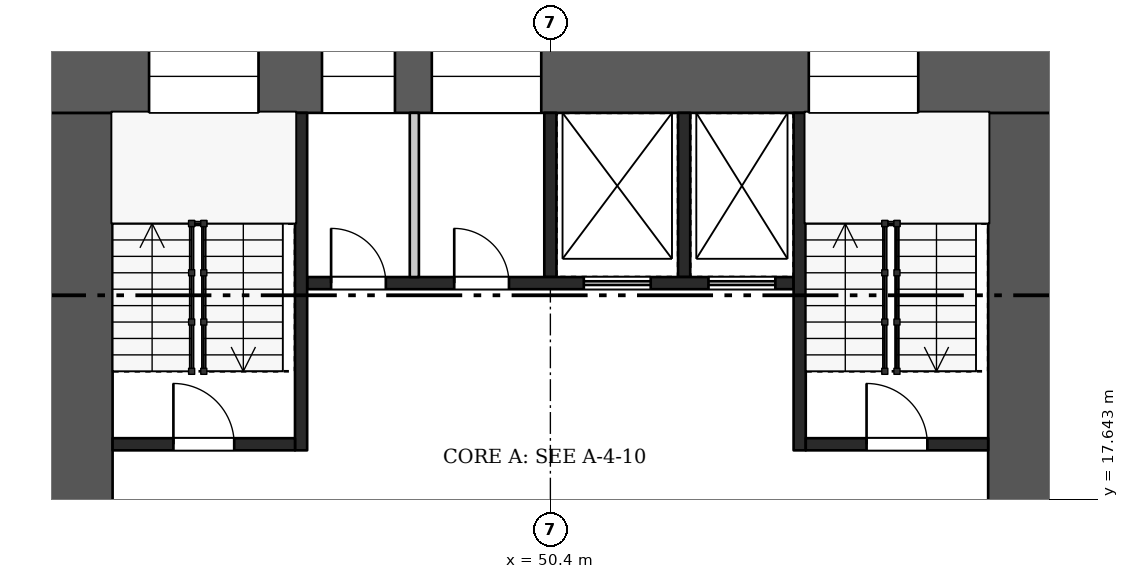
"""IFC4 building model, lengths in metres.
Left out: names, types, materials, properties, quantities, classifications, styles, units other than length and angle.
Written with IfcOpenShell. Run it as: python <this file> out.ifc"""

import sys

from ifc_helpers import new_model, si_unit, direction, frame, frame_2d, origin, place, context, subcontext, project, spatial, rectangle, extrude, element, fill, save


model = new_model("IFC4")
c1 = context("Model", 3, precision=1e-05, world=origin(), true_north=direction((0.0, 1.0)))
c2 = subcontext(c1, "Body", "Model", "MODEL_VIEW")
j1 = project(units=[si_unit("LENGTHUNIT", "METRE"), si_unit("PLANEANGLEUNIT", "RADIAN")], contexts=[c1])
p1 = place(None, origin())
s1 = spatial("IfcSite", under=j1, at=p1, CompositionType="ELEMENT")
p2 = place(p1, origin())
s2 = spatial("IfcBuilding", under=s1, at=p2, CompositionType="ELEMENT")
p3 = place(p2, frame((0.0, 0.0, 35.7)))
s3 = spatial("IfcBuildingStorey", under=s2, at=p3, CompositionType="ELEMENT", Elevation=35.7)
p4 = place(p3, frame((42.0, 24.6, 0.0), z_axis=(0.0, 0.0, 1.0), x_axis=(1.0, 0.0, 0.0)))
e1 = element("IfcWall", 1, at=p4, inside=s3, PredefinedType="SHEAR", context=c2, shape_type="SweptSolid", body=[
    extrude(rectangle(XDim=16.8, YDim=1.2, at=frame_2d((8.4, 0.0))), origin(), (0.0, 0.0, 1.0), 3.22),
])
p5 = place(p4, frame((1.8, 0.0, 0.5)))
e2 = element("IfcOpeningElement", 2, at=p5, cuts=e1, PredefinedType="OPENING", context=c2, shape_type="SweptSolid", body=[
    extrude(rectangle(XDim=1.8, YDim=2.4, at=frame_2d((0.9, 1.2))), frame((0.0, 0.61, 0.0), z_axis=(0.0, -1.0, 0.0), x_axis=(1.0, 0.0, 0.0)), (0.0, 0.0, 1.0), 1.22),
])
p6 = place(p4, frame((4.644, 0.0, 1.6)))
e3 = element("IfcOpeningElement", 3, at=p6, cuts=e1, PredefinedType="OPENING", context=c2, shape_type="SweptSolid", body=[
    extrude(rectangle(XDim=1.2, YDim=1.2, at=frame_2d((0.6, 0.6))), frame((0.0, 0.61, 0.0), z_axis=(0.0, -1.0, 0.0), x_axis=(1.0, 0.0, 0.0)), (0.0, 0.0, 1.0), 1.22),
])
p7 = place(p4, frame((6.45, 0.0, 1.6)))
e4 = element("IfcOpeningElement", 4, at=p7, cuts=e1, PredefinedType="OPENING", context=c2, shape_type="SweptSolid", body=[
    extrude(rectangle(XDim=1.8, YDim=1.2, at=frame_2d((0.9, 0.6))), frame((0.0, 0.61, 0.0), z_axis=(0.0, -1.0, 0.0), x_axis=(1.0, 0.0, 0.0)), (0.0, 0.0, 1.0), 1.22),
])
p8 = place(p4, frame((12.65, 0.0, 0.5)))
e5 = element("IfcOpeningElement", 5, at=p8, cuts=e1, PredefinedType="OPENING", context=c2, shape_type="SweptSolid", body=[
    extrude(rectangle(XDim=1.8, YDim=2.4, at=frame_2d((0.9, 1.2))), frame((0.0, 0.61, 0.0), z_axis=(0.0, -1.0, 0.0), x_axis=(1.0, 0.0, 0.0)), (0.0, 0.0, 1.0), 1.22),
])
p9 = place(p3, frame((42.6, 9.6, 0.0), z_axis=(0.0, 0.0, 1.0), x_axis=(0.0, 1.0, 0.0)))
e6 = element("IfcWall", 6, at=p9, inside=s3, PredefinedType="SHEAR", context=c2, shape_type="SweptSolid", body=[
    extrude(rectangle(XDim=14.4, YDim=1.2, at=frame_2d((7.2, 0.0))), origin(), (0.0, 0.0, 1.0), 3.22),
])
p10 = place(p9, frame((2.1, 0.0, 0.0)))
e7 = element("IfcOpeningElement", 7, at=p10, cuts=e6, PredefinedType="OPENING", context=c2, shape_type="SweptSolid", body=[
    extrude(rectangle(XDim=1.8, YDim=2.1, at=frame_2d((0.9, 1.05))), frame((0.0, 0.61, 0.0), z_axis=(0.0, -1.0, 0.0), x_axis=(1.0, 0.0, 0.0)), (0.0, 0.0, 1.0), 1.22),
])
p11 = place(p3, frame((58.2, 9.6, 0.0), z_axis=(0.0, 0.0, 1.0), x_axis=(0.0, 1.0, 0.0)))
e8 = element("IfcWall", 8, at=p11, inside=s3, PredefinedType="SHEAR", context=c2, shape_type="SweptSolid", body=[
    extrude(rectangle(XDim=14.4, YDim=1.2, at=frame_2d((7.2, 0.0))), origin(), (0.0, 0.0, 1.0), 3.22),
])
p12 = place(p11, frame((2.1, 0.0, 0.0)))
e9 = element("IfcOpeningElement", 9, at=p12, cuts=e8, PredefinedType="OPENING", context=c2, shape_type="SweptSolid", body=[
    extrude(rectangle(XDim=1.8, YDim=2.1, at=frame_2d((0.9, 1.05))), frame((0.0, 0.61, 0.0), z_axis=(0.0, -1.0, 0.0), x_axis=(1.0, 0.0, 0.0)), (0.0, 0.0, 1.0), 1.22),
])
for number, where, z_axis, x_axis in (
    (10, (50.4, 21.3, 0.0), (0.0, 0.0, 1.0), (0.0, 1.0, 0.0)),
    (11, (52.6, 21.3, 0.0), (0.0, 0.0, 1.0), (0.0, 1.0, 0.0)),
):
    element("IfcWall", number, at=place(p3, frame(where, z_axis=z_axis, x_axis=x_axis)), inside=s3, PredefinedType="SHEAR", context=c2, shape_type="SweptSolid", body=[
        extrude(rectangle(XDim=2.7, YDim=0.2, at=frame_2d((1.35, 0.0))), origin(), (0.0, 0.0, 1.0), 3.22),
    ])
p13 = place(p3, frame((48.163, 21.3, 0.0), z_axis=(0.0, 0.0, 1.0), x_axis=(0.0, 1.0, 0.0)))
e12 = element("IfcWall", 12, at=p13, inside=s3, PredefinedType="PARTITIONING", context=c2, shape_type="SweptSolid", body=[
    extrude(rectangle(XDim=2.7, YDim=0.15, at=frame_2d((1.35, 0.0))), origin(), (0.0, 0.0, 1.0), 3.22),
])
p14 = place(p3, frame((46.4, 21.2, 0.0), z_axis=(0.0, 0.0, 1.0), x_axis=(1.0, 0.0, 0.0)))
e13 = element("IfcWall", 13, at=p14, inside=s3, PredefinedType="SHEAR", context=c2, shape_type="SweptSolid", body=[
    extrude(rectangle(XDim=8.0, YDim=0.2, at=frame_2d((4.0, 0.0))), origin(), (0.0, 0.0, 1.0), 3.22),
])
p15 = place(p14, frame((0.394, 0.0, 0.0)))
e14 = element("IfcOpeningElement", 14, at=p15, cuts=e13, PredefinedType="OPENING", context=c2, shape_type="SweptSolid", body=[
    extrude(rectangle(XDim=0.9, YDim=2.1, at=frame_2d((0.45, 1.05))), frame((0.0, 0.11, 0.0), z_axis=(0.0, -1.0, 0.0), x_axis=(1.0, 0.0, 0.0)), (0.0, 0.0, 1.0), 0.22),
])
p16 = place(p14, frame((2.419, 0.0, 0.0)))
e15 = element("IfcOpeningElement", 15, at=p16, cuts=e13, PredefinedType="OPENING", context=c2, shape_type="SweptSolid", body=[
    extrude(rectangle(XDim=0.9, YDim=2.1, at=frame_2d((0.45, 1.05))), frame((0.0, 0.11, 0.0), z_axis=(0.0, -1.0, 0.0), x_axis=(1.0, 0.0, 0.0)), (0.0, 0.0, 1.0), 0.22),
])
p17 = place(p14, frame((4.55, 0.0, 0.0)))
e16 = element("IfcOpeningElement", 16, at=p17, cuts=e13, PredefinedType="OPENING", context=c2, shape_type="SweptSolid", body=[
    extrude(rectangle(XDim=1.1, YDim=2.1, at=frame_2d((0.55, 1.05))), frame((0.0, 0.11, 0.0), z_axis=(0.0, -1.0, 0.0), x_axis=(1.0, 0.0, 0.0)), (0.0, 0.0, 1.0), 0.22),
])
p18 = place(p14, frame((6.6, 0.0, 0.0)))
e17 = element("IfcOpeningElement", 17, at=p18, cuts=e13, PredefinedType="OPENING", context=c2, shape_type="SweptSolid", body=[
    extrude(rectangle(XDim=1.1, YDim=2.1, at=frame_2d((0.55, 1.05))), frame((0.0, 0.11, 0.0), z_axis=(0.0, -1.0, 0.0), x_axis=(1.0, 0.0, 0.0)), (0.0, 0.0, 1.0), 0.22),
])
p19 = place(p3, frame((46.3, 18.45, 0.0), z_axis=(0.0, 0.0, 1.0), x_axis=(0.0, 1.0, 0.0)))
e18 = element("IfcWall", 18, at=p19, inside=s3, PredefinedType="SHEAR", context=c2, shape_type="SweptSolid", body=[
    extrude(rectangle(XDim=5.55, YDim=0.2, at=frame_2d((2.775, 0.0))), origin(), (0.0, 0.0, 1.0), 3.22),
])
p20 = place(p3, frame((43.2, 18.55, 0.0), z_axis=(0.0, 0.0, 1.0), x_axis=(1.0, 0.0, 0.0)))
e19 = element("IfcWall", 19, at=p20, inside=s3, PredefinedType="SHEAR", context=c2, shape_type="SweptSolid", body=[
    extrude(rectangle(XDim=3.0, YDim=0.2, at=frame_2d((1.5, 0.0))), origin(), (0.0, 0.0, 1.0), 3.22),
])
p21 = place(p20, frame((1.0, 0.0, 0.0)))
e20 = element("IfcOpeningElement", 20, at=p21, cuts=e19, PredefinedType="OPENING", context=c2, shape_type="SweptSolid", body=[
    extrude(rectangle(XDim=1.0, YDim=2.1, at=frame_2d((0.5, 1.05))), frame((0.0, 0.11, 0.0), z_axis=(0.0, -1.0, 0.0), x_axis=(1.0, 0.0, 0.0)), (0.0, 0.0, 1.0), 0.22),
])
p22 = place(p3, frame((54.5, 18.45, 0.0), z_axis=(0.0, 0.0, 1.0), x_axis=(0.0, 1.0, 0.0)))
e21 = element("IfcWall", 21, at=p22, inside=s3, PredefinedType="SHEAR", context=c2, shape_type="SweptSolid", body=[
    extrude(rectangle(XDim=5.55, YDim=0.2, at=frame_2d((2.775, 0.0))), origin(), (0.0, 0.0, 1.0), 3.22),
])
p23 = place(p3, frame((54.6, 18.55, 0.0), z_axis=(0.0, 0.0, 1.0), x_axis=(1.0, 0.0, 0.0)))
e22 = element("IfcWall", 22, at=p23, inside=s3, PredefinedType="SHEAR", context=c2, shape_type="SweptSolid", body=[
    extrude(rectangle(XDim=3.0, YDim=0.2, at=frame_2d((1.5, 0.0))), origin(), (0.0, 0.0, 1.0), 3.22),
])
p24 = place(p23, frame((1.0, 0.0, 0.0)))
e23 = element("IfcOpeningElement", 23, at=p24, cuts=e22, PredefinedType="OPENING", context=c2, shape_type="SweptSolid", body=[
    extrude(rectangle(XDim=1.0, YDim=2.1, at=frame_2d((0.5, 1.05))), frame((0.0, 0.11, 0.0), z_axis=(0.0, -1.0, 0.0), x_axis=(1.0, 0.0, 0.0)), (0.0, 0.0, 1.0), 0.22),
])
p25 = place(p15, origin())
e24 = element("IfcDoor", 24, at=p25, inside=s3, OperationType="SINGLE_SWING_LEFT", PredefinedType="DOOR", context=c2, shape_type="SweptSolid", body=[
    extrude(rectangle(XDim=0.9, YDim=2.1, at=frame_2d((0.45, 1.05))), frame((0.0, 0.025, 0.0), z_axis=(0.0, -1.0, 0.0), x_axis=(1.0, 0.0, 0.0)), (0.0, 0.0, 1.0), 0.05),
])
fill(e14, e24)
p26 = place(p16, origin())
e25 = element("IfcDoor", 25, at=p26, inside=s3, OperationType="SINGLE_SWING_LEFT", PredefinedType="DOOR", context=c2, shape_type="SweptSolid", body=[
    extrude(rectangle(XDim=0.9, YDim=2.1, at=frame_2d((0.45, 1.05))), frame((0.0, 0.025, 0.0), z_axis=(0.0, -1.0, 0.0), x_axis=(1.0, 0.0, 0.0)), (0.0, 0.0, 1.0), 0.05),
])
fill(e15, e25)
p27 = place(p17, origin())
e26 = element("IfcDoor", 26, at=p27, inside=s3, OperationType="DOUBLE_DOOR_SLIDING", PredefinedType="DOOR", context=c2, shape_type="SweptSolid", body=[
    extrude(rectangle(XDim=1.1, YDim=2.1, at=frame_2d((0.55, 1.05))), frame((0.0, 0.025, 0.0), z_axis=(0.0, -1.0, 0.0), x_axis=(1.0, 0.0, 0.0)), (0.0, 0.0, 1.0), 0.05),
])
fill(e16, e26)
p28 = place(p18, origin())
e27 = element("IfcDoor", 27, at=p28, inside=s3, OperationType="DOUBLE_DOOR_SLIDING", PredefinedType="DOOR", context=c2, shape_type="SweptSolid", body=[
    extrude(rectangle(XDim=1.1, YDim=2.1, at=frame_2d((0.55, 1.05))), frame((0.0, 0.025, 0.0), z_axis=(0.0, -1.0, 0.0), x_axis=(1.0, 0.0, 0.0)), (0.0, 0.0, 1.0), 0.05),
])
fill(e17, e27)
p29 = place(p21, origin())
e28 = element("IfcDoor", 28, at=p29, inside=s3, OperationType="SINGLE_SWING_LEFT", PredefinedType="DOOR", context=c2, shape_type="SweptSolid", body=[
    extrude(rectangle(XDim=1.0, YDim=2.1, at=frame_2d((0.5, 1.05))), frame((0.0, 0.025, 0.0), z_axis=(0.0, -1.0, 0.0), x_axis=(1.0, 0.0, 0.0)), (0.0, 0.0, 1.0), 0.05),
])
fill(e20, e28)
p30 = place(p24, origin())
e29 = element("IfcDoor", 29, at=p30, inside=s3, OperationType="SINGLE_SWING_LEFT", PredefinedType="DOOR", context=c2, shape_type="SweptSolid", body=[
    extrude(rectangle(XDim=1.0, YDim=2.1, at=frame_2d((0.5, 1.05))), frame((0.0, 0.025, 0.0), z_axis=(0.0, -1.0, 0.0), x_axis=(1.0, 0.0, 0.0)), (0.0, 0.0, 1.0), 0.05),
])
fill(e23, e29)
p31 = place(p5, origin())
e30 = element("IfcWindow", 30, at=p31, inside=s3, PartitioningType="SINGLE_PANEL", PredefinedType="WINDOW", context=c2, shape_type="SweptSolid", body=[
    extrude(rectangle(XDim=1.8, YDim=2.4, at=frame_2d((0.9, 1.2))), frame((0.0, 0.03, 0.0), z_axis=(0.0, -1.0, 0.0), x_axis=(1.0, 0.0, 0.0)), (0.0, 0.0, 1.0), 0.06),
])
fill(e2, e30)
p32 = place(p6, origin())
e31 = element("IfcWindow", 31, at=p32, inside=s3, PartitioningType="SINGLE_PANEL", PredefinedType="WINDOW", context=c2, shape_type="SweptSolid", body=[
    extrude(rectangle(XDim=1.2, YDim=1.2, at=frame_2d((0.6, 0.6))), frame((0.0, 0.03, 0.0), z_axis=(0.0, -1.0, 0.0), x_axis=(1.0, 0.0, 0.0)), (0.0, 0.0, 1.0), 0.06),
])
fill(e3, e31)
p33 = place(p7, origin())
e32 = element("IfcWindow", 32, at=p33, inside=s3, PartitioningType="SINGLE_PANEL", PredefinedType="WINDOW", context=c2, shape_type="SweptSolid", body=[
    extrude(rectangle(XDim=1.8, YDim=1.2, at=frame_2d((0.9, 0.6))), frame((0.0, 0.03, 0.0), z_axis=(0.0, -1.0, 0.0), x_axis=(1.0, 0.0, 0.0)), (0.0, 0.0, 1.0), 0.06),
])
fill(e4, e32)
p34 = place(p8, origin())
e33 = element("IfcWindow", 33, at=p34, inside=s3, PartitioningType="SINGLE_PANEL", PredefinedType="WINDOW", context=c2, shape_type="SweptSolid", body=[
    extrude(rectangle(XDim=1.8, YDim=2.4, at=frame_2d((0.9, 1.2))), frame((0.0, 0.03, 0.0), z_axis=(0.0, -1.0, 0.0), x_axis=(1.0, 0.0, 0.0)), (0.0, 0.0, 1.0), 0.06),
])
fill(e5, e33)
save(model, sys.argv[1])
